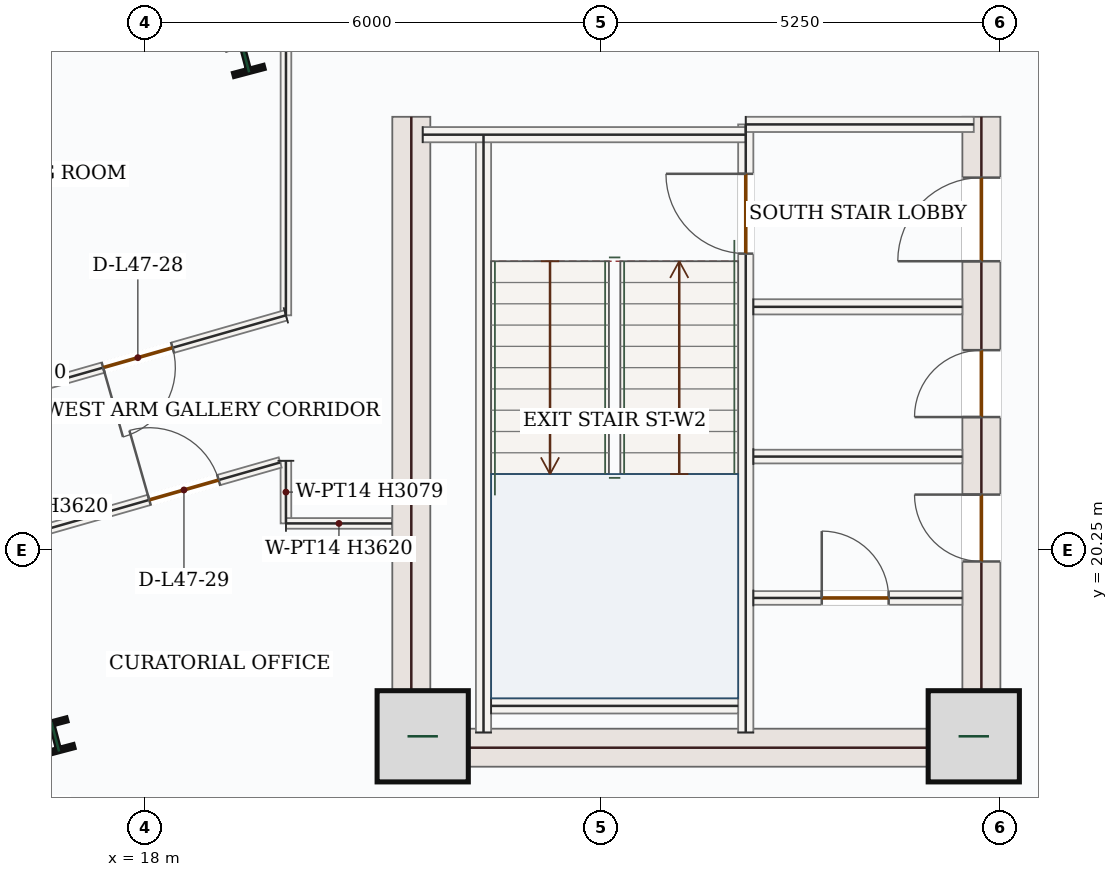
"""IFC4 building model, lengths in metres.
Left out: names, types, materials, properties, quantities, classifications, styles, units other than length and angle.
Written with IfcOpenShell. Run it as: python <this file> out.ifc"""

import sys

from ifc_helpers import new_model, si_unit, direction, frame, frame_2d, origin, origin_2d, place, context, subcontext, project, spatial, rectangle, i_section, extrude, source, transform, mapped, element, fill, save


model = new_model("IFC4")
c1 = context("Model", 3, precision=1e-05, world=origin(), true_north=direction((0.0, 1.0)))
c2 = subcontext(c1, "Body", "Model", "MODEL_VIEW")
j1 = project(units=[si_unit("LENGTHUNIT", "METRE"), si_unit("PLANEANGLEUNIT", "RADIAN")], contexts=[c1])
p1 = place(None, origin())
s1 = spatial("IfcSite", under=j1, at=p1, CompositionType="ELEMENT")
p2 = place(p1, origin())
s2 = spatial("IfcBuilding", under=s1, at=p2, CompositionType="ELEMENT")
p3 = place(p2, frame((0.0, 0.0, 201.9)))
s3 = spatial("IfcBuildingStorey", under=s2, at=p3, CompositionType="ELEMENT", Elevation=201.9)
m1 = source(origin(), c2, "Body", "SweptSolid", [
    extrude(rectangle(XDim=8.55, YDim=0.5, at=frame_2d((4.275, 0.0))), origin(), (0.0, 0.0, 1.0), 3.62),
])
p4 = place(p3, frame((21.5, 17.4, 0.0), z_axis=(0.0, 0.0, 1.0), x_axis=(0.0, 1.0, 0.0)))
e1 = element("IfcWall", 1, at=p4, inside=s3, PredefinedType="SHEAR", context=c2, shape_type="MappedRepresentation", body=[
    mapped(m1, transform((0.0, 0.0, 0.0), x_axis=(1.0, 0.0, 0.0), y_axis=(0.0, 1.0, 0.0), z_axis=(0.0, 0.0, 1.0), scale=1.0)),
])
p5 = place(p3, frame((29.0, 17.4, 0.0), z_axis=(0.0, 0.0, 1.0), x_axis=(0.0, 1.0, 0.0)))
e2 = element("IfcWall", 2, at=p5, inside=s3, PredefinedType="SHEAR", context=c2, shape_type="SweptSolid", body=[
    extrude(rectangle(XDim=8.55, YDim=0.5, at=frame_2d((4.275, 0.0))), origin(), (0.0, 0.0, 1.0), 3.62),
])
p6 = place(p5, frame((6.65, 0.0, 0.0)))
e3 = element("IfcOpeningElement", 3, at=p6, cuts=e2, PredefinedType="OPENING", context=c2, shape_type="SweptSolid", body=[
    extrude(rectangle(XDim=1.1, YDim=2.2, at=frame_2d((0.55, 1.1))), frame((0.0, 0.26, 0.0), z_axis=(0.0, -1.0, 0.0), x_axis=(1.0, 0.0, 0.0)), (0.0, 0.0, 1.0), 0.52),
])
p7 = place(p5, frame((2.7, 0.0, 0.0)))
e4 = element("IfcOpeningElement", 4, at=p7, cuts=e2, PredefinedType="OPENING", context=c2, shape_type="SweptSolid", body=[
    extrude(rectangle(XDim=0.88, YDim=2.1, at=frame_2d((0.44, 1.05))), frame((0.0, 0.26, 0.0), z_axis=(0.0, -1.0, 0.0), x_axis=(1.0, 0.0, 0.0)), (0.0, 0.0, 1.0), 0.52),
])
p8 = place(p5, frame((4.6, 0.0, 0.0)))
e5 = element("IfcOpeningElement", 5, at=p8, cuts=e2, PredefinedType="OPENING", context=c2, shape_type="SweptSolid", body=[
    extrude(rectangle(XDim=0.88, YDim=2.1, at=frame_2d((0.44, 1.05))), frame((0.0, 0.26, 0.0), z_axis=(0.0, -1.0, 0.0), x_axis=(1.0, 0.0, 0.0)), (0.0, 0.0, 1.0), 0.52),
])
m2 = source(origin(), c2, "Body", "SweptSolid", [
    extrude(rectangle(XDim=7.0, YDim=0.5, at=frame_2d((3.5, 0.0))), origin(), (0.0, 0.0, 1.0), 3.62),
])
p9 = place(p3, frame((21.75, 17.65, 0.0), z_axis=(0.0, 0.0, 1.0), x_axis=(1.0, 0.0, 0.0)))
e6 = element("IfcWall", 6, at=p9, inside=s3, PredefinedType="SHEAR", context=c2, shape_type="MappedRepresentation", body=[
    mapped(m2, transform((0.0, 0.0, 0.0), x_axis=(1.0, 0.0, 0.0), y_axis=(0.0, 1.0, 0.0), z_axis=(0.0, 0.0, 1.0), scale=1.0)),
])
m3 = source(origin(), c2, "Body", "SweptSolid", [
    extrude(rectangle(XDim=1.2, YDim=1.2, at=origin_2d()), origin(), (0.0, 0.0, 1.0), 3.9),
])
for number, where, z_axis, x_axis in (
    (7, (21.65, 17.8, 0.0), (0.0, 0.0, 1.0), (1.0, 0.0, 0.0)),
    (8, (28.9, 17.8, 0.0), (0.0, 0.0, 1.0), (1.0, 0.0, 0.0)),
):
    element("IfcColumn", number, at=place(p3, frame(where, z_axis=z_axis, x_axis=x_axis)), inside=s3, PredefinedType="COLUMN", context=c2, shape_type="MappedRepresentation", body=[
        mapped(m3, transform((0.0, 0.0, 0.0), x_axis=(1.0, 0.0, 0.0), y_axis=(0.0, 1.0, 0.0), z_axis=(0.0, 0.0, 1.0), scale=1.0)),
    ])
m4 = source(origin(), c2, "Body", "SweptSolid", [
    extrude(i_section(OverallWidth=0.404, OverallDepth=0.407, WebThickness=0.027, FlangeThickness=0.044, FilletRadius=0.018, at=origin_2d()), origin(), (0.0, 0.0, 1.0), 3.9),
])
for number, where, z_axis, x_axis in (
    (9, (19.316, 26.729, 0.0), (0.0, 0.0, 1.0), (0.967, 0.255, 0.0)),
    (10, (16.815, 17.794, 0.0), (0.0, 0.0, 1.0), (0.967, 0.255, 0.0)),
):
    element("IfcColumn", number, at=place(p3, frame(where, z_axis=z_axis, x_axis=x_axis)), inside=s3, PredefinedType="COLUMN", context=c2, shape_type="MappedRepresentation", body=[
        mapped(m4, transform((0.0, 0.0, 0.0), x_axis=(1.0, 0.0, 0.0), y_axis=(0.0, 1.0, 0.0), z_axis=(0.0, 0.0, 1.0), scale=1.0)),
    ])
m5 = source(origin(), c2, "Body", "SweptSolid", [
    extrude(rectangle(XDim=7.87, YDim=0.2, at=frame_2d((3.935, 0.0))), origin(), (0.0, 0.0, 1.0), 3.62),
])
p10 = place(p3, frame((22.45, 17.85, 0.0), z_axis=(0.0, 0.0, 1.0), x_axis=(0.0, 1.0, 0.0)))
e11 = element("IfcWall", 11, at=p10, inside=s3, PredefinedType="SOLIDWALL", context=c2, shape_type="MappedRepresentation", body=[
    mapped(m5, transform((0.0, 0.0, 0.0), x_axis=(1.0, 0.0, 0.0), y_axis=(0.0, 1.0, 0.0), z_axis=(0.0, 0.0, 1.0), scale=1.0)),
])
p11 = place(p3, frame((25.9, 17.85, 0.0), z_axis=(0.0, 0.0, 1.0), x_axis=(0.0, 1.0, 0.0)))
e12 = element("IfcWall", 12, at=p11, inside=s3, PredefinedType="SOLIDWALL", context=c2, shape_type="SweptSolid", body=[
    extrude(rectangle(XDim=8.0, YDim=0.2, at=frame_2d((4.0, 0.0))), origin(), (0.0, 0.0, 1.0), 3.62),
])
p12 = place(p11, frame((6.3, 0.0, 0.0)))
e13 = element("IfcOpeningElement", 13, at=p12, cuts=e12, PredefinedType="OPENING", context=c2, shape_type="SweptSolid", body=[
    extrude(rectangle(XDim=1.05, YDim=2.15, at=frame_2d((0.525, 1.075))), frame((0.0, 0.11, 0.0), z_axis=(0.0, -1.0, 0.0), x_axis=(1.0, 0.0, 0.0)), (0.0, 0.0, 1.0), 0.22),
])
m6 = source(origin(), c2, "Body", "SweptSolid", [
    extrude(rectangle(XDim=4.25, YDim=0.2, at=frame_2d((2.125, 0.0))), origin(), (0.0, 0.0, 1.0), 3.62),
])
p13 = place(p3, frame((21.65, 25.715, 0.0), z_axis=(0.0, 0.0, 1.0), x_axis=(1.0, 0.0, 0.0)))
e14 = element("IfcWall", 14, at=p13, inside=s3, PredefinedType="SOLIDWALL", context=c2, shape_type="MappedRepresentation", body=[
    mapped(m6, transform((0.0, 0.0, 0.0), x_axis=(1.0, 0.0, 0.0), y_axis=(0.0, 1.0, 0.0), z_axis=(0.0, 0.0, 1.0), scale=1.0)),
])
m7 = source(origin(), c2, "Body", "SweptSolid", [
    extrude(rectangle(XDim=3.0, YDim=0.2, at=frame_2d((1.5, 0.0))), origin(), (0.0, 0.0, 1.0), 3.62),
])
p14 = place(p3, frame((25.9, 25.85, 0.0), z_axis=(0.0, 0.0, 1.0), x_axis=(1.0, 0.0, 0.0)))
e15 = element("IfcWall", 15, at=p14, inside=s3, PredefinedType="SOLIDWALL", context=c2, shape_type="MappedRepresentation", body=[
    mapped(m7, transform((0.0, 0.0, 0.0), x_axis=(1.0, 0.0, 0.0), y_axis=(0.0, 1.0, 0.0), z_axis=(0.0, 0.0, 1.0), scale=1.0)),
])
m8 = source(origin(), c2, "Body", "SweptSolid", [
    extrude(rectangle(XDim=3.25, YDim=0.2, at=frame_2d((1.625, 0.0))), origin(), (0.0, 0.0, 1.0), 3.62),
])
p15 = place(p3, frame((22.55, 18.2, 0.0), z_axis=(0.0, 0.0, 1.0), x_axis=(1.0, 0.0, 0.0)))
e16 = element("IfcWall", 16, at=p15, inside=s3, PredefinedType="SOLIDWALL", context=c2, shape_type="MappedRepresentation", body=[
    mapped(m8, transform((0.0, 0.0, 0.0), x_axis=(1.0, 0.0, 0.0), y_axis=(0.0, 1.0, 0.0), z_axis=(0.0, 0.0, 1.0), scale=1.0)),
])
m9 = source(origin(), c2, "Body", "SweptSolid", [
    extrude(rectangle(XDim=2.75, YDim=0.2, at=frame_2d((1.375, 0.0))), origin(), (0.0, 0.0, 1.0), 3.62),
])
p16 = place(p3, frame((26.0, 23.45, 0.0), z_axis=(0.0, 0.0, 1.0), x_axis=(1.0, 0.0, 0.0)))
e17 = element("IfcWall", 17, at=p16, inside=s3, PredefinedType="SOLIDWALL", context=c2, shape_type="MappedRepresentation", body=[
    mapped(m9, transform((0.0, 0.0, 0.0), x_axis=(1.0, 0.0, 0.0), y_axis=(0.0, 1.0, 0.0), z_axis=(0.0, 0.0, 1.0), scale=1.0)),
])
p17 = place(p3, frame((26.0, 19.62, 0.0), z_axis=(0.0, 0.0, 1.0), x_axis=(1.0, 0.0, 0.0)))
e18 = element("IfcWall", 18, at=p17, inside=s3, PredefinedType="PARTITIONING", context=c2, shape_type="SweptSolid", body=[
    extrude(rectangle(XDim=2.75, YDim=0.18, at=frame_2d((1.375, 0.0))), origin(), (0.0, 0.0, 1.0), 3.62),
])
p18 = place(p17, frame((0.9, 0.0, 0.0)))
e19 = element("IfcOpeningElement", 19, at=p18, cuts=e18, PredefinedType="OPENING", context=c2, shape_type="SweptSolid", body=[
    extrude(rectangle(XDim=0.88, YDim=2.1, at=frame_2d((0.44, 1.05))), frame((0.0, 0.1, 0.0), z_axis=(0.0, -1.0, 0.0), x_axis=(1.0, 0.0, 0.0)), (0.0, 0.0, 1.0), 0.2),
])
m10 = source(origin(), c2, "Body", "SweptSolid", [
    extrude(rectangle(XDim=2.75, YDim=0.18, at=frame_2d((1.375, 0.0))), origin(), (0.0, 0.0, 1.0), 3.62),
])
p19 = place(p3, frame((26.0, 21.48, 0.0), z_axis=(0.0, 0.0, 1.0), x_axis=(1.0, 0.0, 0.0)))
e20 = element("IfcWall", 20, at=p19, inside=s3, PredefinedType="PARTITIONING", context=c2, shape_type="MappedRepresentation", body=[
    mapped(m10, transform((0.0, 0.0, 0.0), x_axis=(1.0, 0.0, 0.0), y_axis=(0.0, 1.0, 0.0), z_axis=(0.0, 0.0, 1.0), scale=1.0)),
])
m11 = source(origin(), c2, "Body", "SweptSolid", [
    extrude(rectangle(XDim=10.061, YDim=0.14, at=frame_2d((5.031, 0.0))), origin(), (0.0, 0.0, 1.0), 2.693),
])
p20 = place(p3, frame((19.854, 33.399, 0.0), z_axis=(0.0, 0.0, 1.0), x_axis=(-0.000363980467, -0.999999933759, 0.0)))
e21 = element("IfcWall", 21, at=p20, inside=s3, PredefinedType="PARTITIONING", context=c2, shape_type="MappedRepresentation", body=[
    mapped(m11, transform((0.0, 0.0, 0.0), x_axis=(1.0, 0.0, 0.0), y_axis=(0.0, 1.0, 0.0), z_axis=(0.0, 0.0, 1.0), scale=1.0)),
])
p21 = place(p3, frame((19.85, 23.338, 0.0), z_axis=(0.0, 0.0, 1.0), x_axis=(-0.961455430103, -0.274960826164, 0.0)))
e22 = element("IfcWall", 22, at=p21, inside=s3, PredefinedType="PARTITIONING", context=c2, shape_type="SweptSolid", body=[
    extrude(rectangle(XDim=5.381, YDim=0.14, at=frame_2d((2.69, 0.0))), origin(), (0.0, 0.0, 1.0), 3.62),
])
p22 = place(p21, frame((1.551, 0.0, 0.0)))
e23 = element("IfcOpeningElement", 23, at=p22, cuts=e22, PredefinedType="OPENING", context=c2, shape_type="SweptSolid", body=[
    extrude(rectangle(XDim=0.95, YDim=2.15, at=frame_2d((0.475, 1.075))), frame((0.0, 0.08, 0.0), z_axis=(0.0, -1.0, 0.0), x_axis=(1.0, 0.0, 0.0)), (0.0, 0.0, 1.0), 0.16),
])
m12 = source(origin(), c2, "Body", "SweptSolid", [
    extrude(rectangle(XDim=0.823, YDim=0.14, at=frame_2d((0.412, 0.0))), origin(), (0.0, 0.0, 1.0), 3.079),
])
p23 = place(p3, frame((19.85, 21.424, 0.0), z_axis=(0.0, 0.0, 1.0), x_axis=(0.001186238786, -0.999999296419, 0.0)))
e24 = element("IfcWall", 24, at=p23, inside=s3, PredefinedType="PARTITIONING", context=c2, shape_type="MappedRepresentation", body=[
    mapped(m12, transform((0.0, 0.0, 0.0), x_axis=(1.0, 0.0, 0.0), y_axis=(0.0, 1.0, 0.0), z_axis=(0.0, 0.0, 1.0), scale=1.0)),
])
m13 = source(origin(), c2, "Body", "SweptSolid", [
    extrude(rectangle(XDim=1.394, YDim=0.14, at=frame_2d((0.697, 0.0))), origin(), (0.0, 0.0, 1.0), 3.62),
])
p24 = place(p3, frame((19.851, 20.601, 0.0), z_axis=(0.0, 0.0, 1.0), x_axis=(0.999999754632, -0.000700525222, 0.0)))
e25 = element("IfcWall", 25, at=p24, inside=s3, PredefinedType="PARTITIONING", context=c2, shape_type="MappedRepresentation", body=[
    mapped(m13, transform((0.0, 0.0, 0.0), x_axis=(1.0, 0.0, 0.0), y_axis=(0.0, 1.0, 0.0), z_axis=(0.0, 0.0, 1.0), scale=1.0)),
])
p25 = place(p3, frame((15.183, 20.09, 0.0), z_axis=(0.0, 0.0, 1.0), x_axis=(0.961460270043, 0.274943901784, 0.0)))
e26 = element("IfcWall", 26, at=p25, inside=s3, PredefinedType="PARTITIONING", context=c2, shape_type="SweptSolid", body=[
    extrude(rectangle(XDim=4.776, YDim=0.14, at=frame_2d((2.388, 0.0))), origin(), (0.0, 0.0, 1.0), 3.62),
])
p26 = place(p25, frame((2.985, 0.0, 0.0)))
e27 = element("IfcOpeningElement", 27, at=p26, cuts=e26, PredefinedType="OPENING", context=c2, shape_type="SweptSolid", body=[
    extrude(rectangle(XDim=0.95, YDim=2.15, at=frame_2d((0.475, 1.075))), frame((0.0, 0.08, 0.0), z_axis=(0.0, -1.0, 0.0), x_axis=(1.0, 0.0, 0.0)), (0.0, 0.0, 1.0), 0.16),
])
m14 = source(origin(), c2, "Body", "SweptSolid", [
    extrude(rectangle(XDim=1.05, YDim=2.15, at=frame_2d((0.525, 1.075))), frame((0.0, 0.025, 0.0), z_axis=(0.0, -1.0, 0.0), x_axis=(1.0, 0.0, 0.0)), (0.0, 0.0, 1.0), 0.05),
])
p27 = place(p12, origin())
e28 = element("IfcDoor", 28, at=p27, inside=s3, OperationType="SINGLE_SWING_RIGHT", PredefinedType="DOOR", context=c2, shape_type="MappedRepresentation", body=[
    mapped(m14, transform((0.0, 0.0, 0.0), x_axis=(1.0, 0.0, 0.0), y_axis=(0.0, 1.0, 0.0), z_axis=(0.0, 0.0, 1.0), scale=1.0)),
])
fill(e13, e28)
m15 = source(origin(), c2, "Body", "SweptSolid", [
    extrude(rectangle(XDim=1.1, YDim=2.2, at=frame_2d((0.55, 1.1))), frame((0.0, 0.025, 0.0), z_axis=(0.0, -1.0, 0.0), x_axis=(1.0, 0.0, 0.0)), (0.0, 0.0, 1.0), 0.05),
])
p28 = place(p6, origin())
e29 = element("IfcDoor", 29, at=p28, inside=s3, OperationType="SINGLE_SWING_LEFT", PredefinedType="DOOR", context=c2, shape_type="MappedRepresentation", body=[
    mapped(m15, transform((0.0, 0.0, 0.0), x_axis=(1.0, 0.0, 0.0), y_axis=(0.0, 1.0, 0.0), z_axis=(0.0, 0.0, 1.0), scale=1.0)),
])
fill(e3, e29)
m16 = source(origin(), c2, "Body", "SweptSolid", [
    extrude(rectangle(XDim=0.88, YDim=2.1, at=frame_2d((0.44, 1.05))), frame((0.0, 0.025, 0.0), z_axis=(0.0, -1.0, 0.0), x_axis=(1.0, 0.0, 0.0)), (0.0, 0.0, 1.0), 0.05),
])
p29 = place(p18, origin())
e30 = element("IfcDoor", 30, at=p29, inside=s3, OperationType="SINGLE_SWING_LEFT", PredefinedType="DOOR", context=c2, shape_type="MappedRepresentation", body=[
    mapped(m16, transform((0.0, 0.0, 0.0), x_axis=(1.0, 0.0, 0.0), y_axis=(0.0, 1.0, 0.0), z_axis=(0.0, 0.0, 1.0), scale=1.0)),
])
fill(e19, e30)
p30 = place(p7, origin())
e31 = element("IfcDoor", 31, at=p30, inside=s3, OperationType="SINGLE_SWING_RIGHT", PredefinedType="DOOR", context=c2, shape_type="MappedRepresentation", body=[
    mapped(m16, transform((0.0, 0.0, 0.0), x_axis=(1.0, 0.0, 0.0), y_axis=(0.0, 1.0, 0.0), z_axis=(0.0, 0.0, 1.0), scale=1.0)),
])
fill(e4, e31)
p31 = place(p8, origin())
e32 = element("IfcDoor", 32, at=p31, inside=s3, OperationType="SINGLE_SWING_LEFT", PredefinedType="DOOR", context=c2, shape_type="MappedRepresentation", body=[
    mapped(m16, transform((0.0, 0.0, 0.0), x_axis=(1.0, 0.0, 0.0), y_axis=(0.0, 1.0, 0.0), z_axis=(0.0, 0.0, 1.0), scale=1.0)),
])
fill(e5, e32)
m17 = source(origin(), c2, "Body", "SweptSolid", [
    extrude(rectangle(XDim=0.95, YDim=2.15, at=frame_2d((0.475, 1.075))), frame((0.0, 0.025, 0.0), z_axis=(0.0, -1.0, 0.0), x_axis=(1.0, 0.0, 0.0)), (0.0, 0.0, 1.0), 0.05),
])
p32 = place(p22, origin())
e33 = element("IfcDoor", 33, at=p32, inside=s3, OperationType="SINGLE_SWING_RIGHT", PredefinedType="DOOR", context=c2, shape_type="MappedRepresentation", body=[
    mapped(m17, transform((0.0, 0.0, 0.0), x_axis=(1.0, 0.0, 0.0), y_axis=(0.0, 1.0, 0.0), z_axis=(0.0, 0.0, 1.0), scale=1.0)),
])
fill(e23, e33)
p33 = place(p26, origin())
e34 = element("IfcDoor", 34, at=p33, inside=s3, OperationType="SINGLE_SWING_LEFT", PredefinedType="DOOR", context=c2, shape_type="MappedRepresentation", body=[
    mapped(m17, transform((0.0, 0.0, 0.0), x_axis=(1.0, 0.0, 0.0), y_axis=(0.0, 1.0, 0.0), z_axis=(0.0, 0.0, 1.0), scale=1.0)),
])
fill(e27, e34)
save(model, sys.argv[1])
